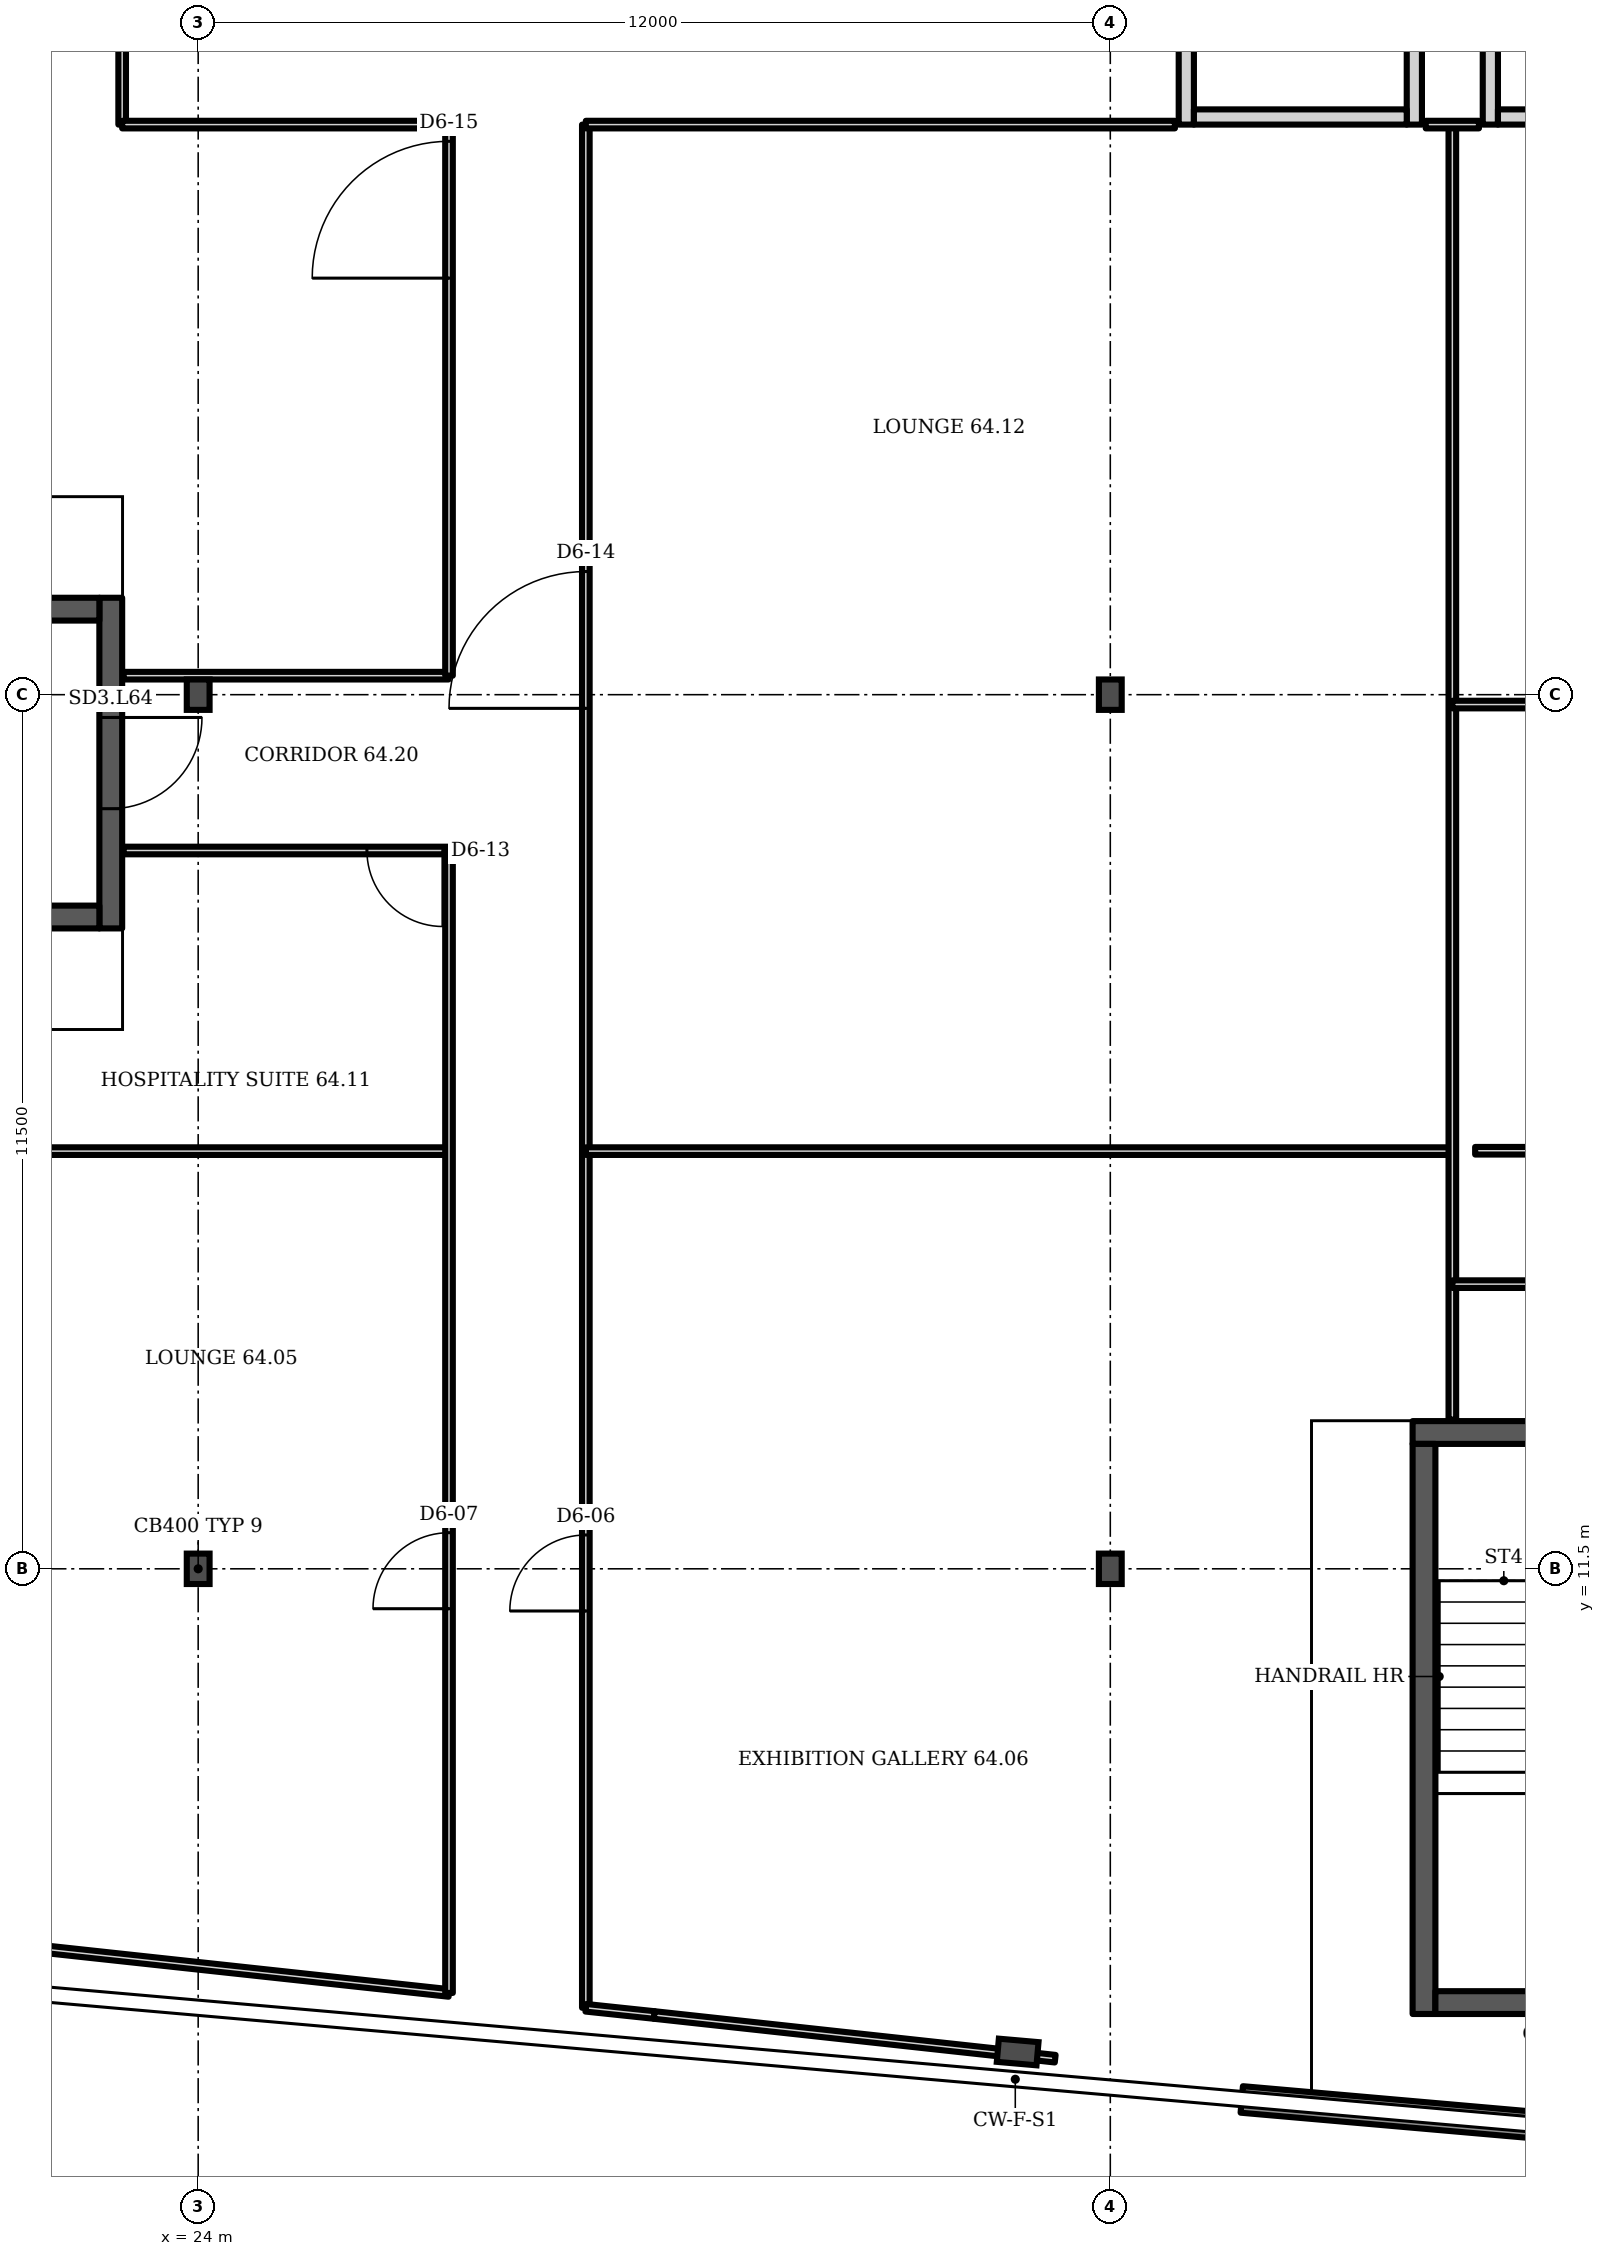
"""IFC4 building model, lengths in metres.
Left out: names, types, materials, properties, quantities, classifications, styles, units other than length and angle.
Written with IfcOpenShell. Run it as: python <this file> out.ifc"""

import sys

from ifc_helpers import new_model, si_unit, direction, frame, frame_2d, origin, origin_2d, place, context, subcontext, project, spatial, rectangle, i_section, extrude, element, fill, save


model = new_model("IFC4")
c1 = context("Model", 3, precision=1e-05, world=origin(), true_north=direction((0.0, 1.0)))
c2 = subcontext(c1, "Body", "Model", "MODEL_VIEW")
j1 = project(units=[si_unit("LENGTHUNIT", "METRE"), si_unit("PLANEANGLEUNIT", "RADIAN")], contexts=[c1])
p1 = place(None, origin())
s1 = spatial("IfcSite", under=j1, at=p1, CompositionType="ELEMENT")
p2 = place(p1, origin())
s2 = spatial("IfcBuilding", under=s1, at=p2, CompositionType="ELEMENT")
p3 = place(p2, frame((0.0, 0.0, 253.9)))
s3 = spatial("IfcBuildingStorey", under=s2, at=p3, CompositionType="ELEMENT", Elevation=253.9)
p4 = place(p3, frame((34.781, 5.143, 0.0), z_axis=(0.0, 0.0, 1.0), x_axis=(-0.087156, -0.996197, 0.0)))
e1 = element("IfcColumn", 1, at=p4, inside=s3, PredefinedType="COLUMN", context=c2, shape_type="SweptSolid", body=[
    extrude(i_section(OverallWidth=0.306, OverallDepth=0.524, WebThickness=0.021, FlangeThickness=0.04, FilletRadius=0.027, at=origin_2d()), origin(), (0.0, 0.0, 1.0), 3.6),
])
for number, where, z_axis, x_axis in (
    (2, (24.0, 11.5, 0.0), (0.0, 0.0, 1.0), (1.0, 0.0, 0.0)),
    (3, (36.0, 11.5, 0.0), (0.0, 0.0, 1.0), (1.0, 0.0, 0.0)),
    (4, (24.0, 23.0, 0.0), (0.0, 0.0, 1.0), (1.0, 0.0, 0.0)),
    (5, (36.0, 23.0, 0.0), (0.0, 0.0, 1.0), (1.0, 0.0, 0.0)),
):
    element("IfcColumn", number, at=place(p3, frame(where, z_axis=z_axis, x_axis=x_axis)), inside=s3, PredefinedType="COLUMN", context=c2, shape_type="SweptSolid", body=[
        extrude(i_section(OverallWidth=0.3, OverallDepth=0.4, WebThickness=0.013, FlangeThickness=0.024, FilletRadius=0.027, at=origin_2d()), origin(), (0.0, 0.0, 1.0), 3.6),
    ])
p5 = place(p3, frame((37.729, 4.519, 0.0), z_axis=(0.0, 0.0, 1.0), x_axis=(0.99619, -0.087167, 0.0)))
e6 = element("IfcWall", 6, at=p5, inside=s3, PredefinedType="SOLIDWALL", context=c2, shape_type="SweptSolid", body=[
    extrude(rectangle(XDim=11.831, YDim=0.35, at=frame_2d((5.915, 0.0))), origin(), (0.0, 0.0, 1.0), 1.0),
])
p6 = place(p3, frame((37.0, 30.5, 0.0), z_axis=(0.0, 0.0, 1.0), x_axis=(0.0, 1.0, 0.0)))
e7 = element("IfcWall", 7, at=p6, inside=s3, PredefinedType="PARTITIONING", context=c2, shape_type="SweptSolid", body=[
    extrude(rectangle(XDim=3.5, YDim=0.2, at=frame_2d((1.75, 0.0))), origin(), (0.0, 0.0, 1.0), 3.2),
])
p7 = place(p6, frame((1.2, 0.0, 0.0)))
e8 = element("IfcOpeningElement", 8, at=p7, cuts=e7, PredefinedType="OPENING", context=c2, shape_type="SweptSolid", body=[
    extrude(rectangle(XDim=1.1, YDim=2.1, at=frame_2d((0.55, 1.05))), frame((0.0, 0.11, 0.0), z_axis=(0.0, -1.0, 0.0), x_axis=(1.0, 0.0, 0.0)), (0.0, 0.0, 1.0), 0.22),
])
p8 = place(p3, frame((40.0, 30.5, 0.0), z_axis=(0.0, 0.0, 1.0), x_axis=(0.0, 1.0, 0.0)))
e9 = element("IfcWall", 9, at=p8, inside=s3, PredefinedType="PARTITIONING", context=c2, shape_type="SweptSolid", body=[
    extrude(rectangle(XDim=3.5, YDim=0.2, at=frame_2d((1.75, 0.0))), origin(), (0.0, 0.0, 1.0), 3.2),
])
p9 = place(p3, frame((37.1, 30.6, 0.0), z_axis=(0.0, 0.0, 1.0), x_axis=(1.0, 0.0, 0.0)))
e10 = element("IfcWall", 10, at=p9, inside=s3, PredefinedType="PARTITIONING", context=c2, shape_type="SweptSolid", body=[
    extrude(rectangle(XDim=2.8, YDim=0.2, at=frame_2d((1.4, 0.0))), origin(), (0.0, 0.0, 1.0), 3.2),
])
p10 = place(p3, frame((41.0, 30.5, 0.0), z_axis=(0.0, 0.0, 1.0), x_axis=(0.0, 1.0, 0.0)))
e11 = element("IfcWall", 11, at=p10, inside=s3, PredefinedType="PARTITIONING", context=c2, shape_type="SweptSolid", body=[
    extrude(rectangle(XDim=3.5, YDim=0.2, at=frame_2d((1.75, 0.0))), origin(), (0.0, 0.0, 1.0), 3.2),
])
p11 = place(p3, frame((41.1, 30.6, 0.0), z_axis=(0.0, 0.0, 1.0), x_axis=(1.0, 0.0, 0.0)))
e12 = element("IfcWall", 12, at=p11, inside=s3, PredefinedType="PARTITIONING", context=c2, shape_type="SweptSolid", body=[
    extrude(rectangle(XDim=2.8, YDim=0.2, at=frame_2d((1.4, 0.0))), origin(), (0.0, 0.0, 1.0), 3.2),
])
p12 = place(p3, frame((22.85, 19.925, 0.0), z_axis=(0.0, 0.0, 1.0), x_axis=(0.0, 1.0, 0.0)))
e13 = element("IfcWall", 13, at=p12, inside=s3, PredefinedType="SHEAR", context=c2, shape_type="SweptSolid", body=[
    extrude(rectangle(XDim=4.35, YDim=0.3, at=frame_2d((2.175, 0.0))), origin(), (0.0, 0.0, 1.0), 3.2),
])
p13 = place(p12, frame((1.575, 0.0, 0.0)))
e14 = element("IfcOpeningElement", 14, at=p13, cuts=e13, PredefinedType="OPENING", context=c2, shape_type="SweptSolid", body=[
    extrude(rectangle(XDim=1.2, YDim=2.1, at=frame_2d((0.6, 1.05))), frame((0.0, 0.16, 0.0), z_axis=(0.0, -1.0, 0.0), x_axis=(1.0, 0.0, 0.0)), (0.0, 0.0, 1.0), 0.32),
])
p14 = place(p3, frame((39.977, 13.293, 0.0), z_axis=(0.0, 0.0, 1.0), x_axis=(1.0, 0.0, 0.0)))
e15 = element("IfcWall", 15, at=p14, inside=s3, PredefinedType="SHEAR", context=c2, shape_type="SweptSolid", body=[
    extrude(rectangle(XDim=4.35, YDim=0.3, at=frame_2d((2.175, 0.0))), origin(), (0.0, 0.0, 1.0), 3.2),
])
p15 = place(p14, frame((1.575, 0.0, 0.0)))
e16 = element("IfcOpeningElement", 16, at=p15, cuts=e15, PredefinedType="OPENING", context=c2, shape_type="SweptSolid", body=[
    extrude(rectangle(XDim=1.2, YDim=2.1, at=frame_2d((0.6, 1.05))), frame((0.0, 0.16, 0.0), z_axis=(0.0, -1.0, 0.0), x_axis=(1.0, 0.0, 0.0)), (0.0, 0.0, 1.0), 0.32),
])
p16 = place(p3, frame((14.96, 16.995, 0.0), z_axis=(0.0, 0.0, 1.0), x_axis=(1.0, 0.0, 0.0)))
e17 = element("IfcWall", 17, at=p16, inside=s3, PredefinedType="PARTITIONING", context=c2, shape_type="SweptSolid", body=[
    extrude(rectangle(XDim=12.34, YDim=0.1, at=frame_2d((6.17, 0.0))), origin(), (0.0, 0.0, 1.0), 3.2),
])
p17 = place(p3, frame((23.0, 30.5, 0.0), z_axis=(0.0, 0.0, 1.0), x_axis=(0.0, 1.0, 0.0)))
e18 = element("IfcWall", 18, at=p17, inside=s3, PredefinedType="PARTITIONING", context=c2, shape_type="SweptSolid", body=[
    extrude(rectangle(XDim=3.48, YDim=0.1, at=frame_2d((1.74, 0.0))), origin(), (0.0, 0.0, 1.0), 3.2),
])
p18 = place(p3, frame((23.0, 30.5, 0.0), z_axis=(0.0, 0.0, 1.0), x_axis=(1.0, 0.0, 0.0)))
e19 = element("IfcWall", 19, at=p18, inside=s3, PredefinedType="PARTITIONING", context=c2, shape_type="SweptSolid", body=[
    extrude(rectangle(XDim=4.3, YDim=0.1, at=frame_2d((2.15, 0.0))), origin(), (0.0, 0.0, 1.0), 3.2),
])
p19 = place(p3, frame((23.02, 20.95, 0.0), z_axis=(0.0, 0.0, 1.0), x_axis=(1.0, 0.0, 0.0)))
e20 = element("IfcWall", 20, at=p19, inside=s3, PredefinedType="PARTITIONING", context=c2, shape_type="SweptSolid", body=[
    extrude(rectangle(XDim=4.28, YDim=0.1, at=frame_2d((2.14, 0.0))), origin(), (0.0, 0.0, 1.0), 3.2),
])
p20 = place(p19, frame((3.2, 0.0, 0.0)))
e21 = element("IfcOpeningElement", 21, at=p20, cuts=e20, PredefinedType="OPENING", context=c2, shape_type="SweptSolid", body=[
    extrude(rectangle(XDim=1.0, YDim=2.1, at=frame_2d((0.5, 1.05))), frame((0.0, 0.06, 0.0), z_axis=(0.0, -1.0, 0.0), x_axis=(1.0, 0.0, 0.0)), (0.0, 0.0, 1.0), 0.12),
])
p21 = place(p3, frame((23.02, 23.25, 0.0), z_axis=(0.0, 0.0, 1.0), x_axis=(1.0, 0.0, 0.0)))
e22 = element("IfcWall", 22, at=p21, inside=s3, PredefinedType="PARTITIONING", context=c2, shape_type="SweptSolid", body=[
    extrude(rectangle(XDim=4.275, YDim=0.1, at=frame_2d((2.137, 0.0))), origin(), (0.0, 0.0, 1.0), 3.2),
])
p22 = place(p3, frame((27.3, 5.92, 0.0), z_axis=(0.0, 0.0, 1.0), x_axis=(-0.994192, 0.107591, 0.0)))
e23 = element("IfcWall", 23, at=p22, inside=s3, PredefinedType="PARTITIONING", context=c2, shape_type="SweptSolid", body=[
    extrude(rectangle(XDim=7.323, YDim=0.1, at=frame_2d((3.661, 0.0))), origin(), (0.0, 0.0, 1.0), 2.58),
])
p23 = place(p3, frame((27.3, 23.25, 0.0), z_axis=(0.0, 0.0, 1.0), x_axis=(0.0, 1.0, 0.0)))
e24 = element("IfcWall", 24, at=p23, inside=s3, PredefinedType="PARTITIONING", context=c2, shape_type="SweptSolid", body=[
    extrude(rectangle(XDim=7.25, YDim=0.1, at=frame_2d((3.625, 0.0))), origin(), (0.0, 0.0, 1.0), 3.2),
])
p24 = place(p23, frame((5.23, 0.0, 0.0)))
e25 = element("IfcOpeningElement", 25, at=p24, cuts=e24, PredefinedType="OPENING", context=c2, shape_type="SweptSolid", body=[
    extrude(rectangle(XDim=1.8, YDim=2.1, at=frame_2d((0.9, 1.05))), frame((0.0, 0.06, 0.0), z_axis=(0.0, -1.0, 0.0), x_axis=(1.0, 0.0, 0.0)), (0.0, 0.0, 1.0), 0.12),
])
p25 = place(p3, frame((27.3, 5.92, 0.0), z_axis=(0.0, 0.0, 1.0), x_axis=(0.0, 1.0, 0.0)))
e26 = element("IfcWall", 26, at=p25, inside=s3, PredefinedType="PARTITIONING", context=c2, shape_type="SweptSolid", body=[
    extrude(rectangle(XDim=15.03, YDim=0.1, at=frame_2d((7.515, 0.0))), origin(), (0.0, 0.0, 1.0), 3.2),
])
p26 = place(p25, frame((5.055, 0.0, 0.0)))
e27 = element("IfcOpeningElement", 27, at=p26, cuts=e26, PredefinedType="OPENING", context=c2, shape_type="SweptSolid", body=[
    extrude(rectangle(XDim=1.0, YDim=2.1, at=frame_2d((0.5, 1.05))), frame((0.0, 0.06, 0.0), z_axis=(0.0, -1.0, 0.0), x_axis=(1.0, 0.0, 0.0)), (0.0, 0.0, 1.0), 0.12),
])
p27 = place(p3, frame((29.1, 5.725, 0.0), z_axis=(0.0, 0.0, 1.0), x_axis=(0.0, 1.0, 0.0)))
e28 = element("IfcWall", 28, at=p27, inside=s3, PredefinedType="PARTITIONING", context=c2, shape_type="SweptSolid", body=[
    extrude(rectangle(XDim=24.775, YDim=0.1, at=frame_2d((12.387, 0.0))), origin(), (0.0, 0.0, 1.0), 3.2),
])
p28 = place(p27, frame((5.22, 0.0, 0.0)))
e29 = element("IfcOpeningElement", 29, at=p28, cuts=e28, PredefinedType="OPENING", context=c2, shape_type="SweptSolid", body=[
    extrude(rectangle(XDim=1.0, YDim=2.1, at=frame_2d((0.5, 1.05))), frame((0.0, 0.06, 0.0), z_axis=(0.0, -1.0, 0.0), x_axis=(1.0, 0.0, 0.0)), (0.0, 0.0, 1.0), 0.12),
])
p29 = place(p27, frame((17.095, 0.0, 0.0)))
e30 = element("IfcOpeningElement", 30, at=p29, cuts=e28, PredefinedType="OPENING", context=c2, shape_type="SweptSolid", body=[
    extrude(rectangle(XDim=1.8, YDim=2.1, at=frame_2d((0.9, 1.05))), frame((0.0, 0.06, 0.0), z_axis=(0.0, -1.0, 0.0), x_axis=(1.0, 0.0, 0.0)), (0.0, 0.0, 1.0), 0.12),
])
p30 = place(p3, frame((29.1, 16.995, 0.0), z_axis=(0.0, 0.0, 1.0), x_axis=(1.0, 0.0, 0.0)))
e31 = element("IfcWall", 31, at=p30, inside=s3, PredefinedType="PARTITIONING", context=c2, shape_type="SweptSolid", body=[
    extrude(rectangle(XDim=11.4, YDim=0.1, at=frame_2d((5.7, 0.0))), origin(), (0.0, 0.0, 1.0), 3.2),
])
p31 = place(p3, frame((29.1, 30.5, 0.0), z_axis=(0.0, 0.0, 1.0), x_axis=(1.0, 0.0, 0.0)))
e32 = element("IfcWall", 32, at=p31, inside=s3, PredefinedType="PARTITIONING", context=c2, shape_type="SweptSolid", body=[
    extrude(rectangle(XDim=7.75, YDim=0.1, at=frame_2d((3.875, 0.0))), origin(), (0.0, 0.0, 1.0), 3.2),
])
p32 = place(p3, frame((30.0, 5.63, 0.0), z_axis=(0.0, 0.0, 1.0), x_axis=(-0.994445, 0.105218, 0.0)))
e33 = element("IfcWall", 33, at=p32, inside=s3, PredefinedType="PARTITIONING", context=c2, shape_type="SweptSolid", body=[
    extrude(rectangle(XDim=0.905, YDim=0.1, at=frame_2d((0.453, 0.0))), origin(), (0.0, 0.0, 1.0), 2.58),
])
p33 = place(p3, frame((35.275, 5.055, 0.0), z_axis=(0.0, 0.0, 1.0), x_axis=(-0.994115, 0.108356, 0.0)))
e34 = element("IfcWall", 34, at=p33, inside=s3, PredefinedType="PARTITIONING", context=c2, shape_type="SweptSolid", body=[
    extrude(rectangle(XDim=5.306, YDim=0.1, at=frame_2d((2.653, 0.0))), origin(), (0.0, 0.0, 1.0), 2.58),
])
p34 = place(p3, frame((40.5, 13.463, 0.0), z_axis=(0.0, 0.0, 1.0), x_axis=(0.0, 1.0, 0.0)))
e35 = element("IfcWall", 35, at=p34, inside=s3, PredefinedType="PARTITIONING", context=c2, shape_type="SweptSolid", body=[
    extrude(rectangle(XDim=17.037, YDim=0.1, at=frame_2d((8.519, 0.0))), origin(), (0.0, 0.0, 1.0), 3.2),
])
p35 = place(p3, frame((40.5, 15.245, 0.0), z_axis=(0.0, 0.0, 1.0), x_axis=(1.0, 0.0, 0.0)))
e36 = element("IfcWall", 36, at=p35, inside=s3, PredefinedType="PARTITIONING", context=c2, shape_type="SweptSolid", body=[
    extrude(rectangle(XDim=9.52, YDim=0.1, at=frame_2d((4.76, 0.0))), origin(), (0.0, 0.0, 1.0), 3.2),
])
p36 = place(p35, frame((8.125, 0.0, 0.0)))
e37 = element("IfcOpeningElement", 37, at=p36, cuts=e36, PredefinedType="OPENING", context=c2, shape_type="SweptSolid", body=[
    extrude(rectangle(XDim=1.0, YDim=2.1, at=frame_2d((0.5, 1.05))), frame((0.0, 0.06, 0.0), z_axis=(0.0, -1.0, 0.0), x_axis=(1.0, 0.0, 0.0)), (0.0, 0.0, 1.0), 0.12),
])
p37 = place(p3, frame((40.5, 22.87, 0.0), z_axis=(0.0, 0.0, 1.0), x_axis=(1.0, 0.0, 0.0)))
e38 = element("IfcWall", 38, at=p37, inside=s3, PredefinedType="PARTITIONING", context=c2, shape_type="SweptSolid", body=[
    extrude(rectangle(XDim=9.52, YDim=0.1, at=frame_2d((4.76, 0.0))), origin(), (0.0, 0.0, 1.0), 3.2),
])
p38 = place(p3, frame((40.8, 17.0, 0.0), z_axis=(0.0, 0.0, 1.0), x_axis=(1.0, 0.0, 0.0)))
e39 = element("IfcWall", 39, at=p38, inside=s3, PredefinedType="PARTITIONING", context=c2, shape_type="SweptSolid", body=[
    extrude(rectangle(XDim=1.325, YDim=0.1, at=frame_2d((0.663, 0.0))), origin(), (0.0, 0.0, 1.0), 3.2),
])
p39 = place(p3, frame((40.15, 30.5, 0.0), z_axis=(0.0, 0.0, 1.0), x_axis=(1.0, 0.0, 0.0)))
e40 = element("IfcWall", 40, at=p39, inside=s3, PredefinedType="PARTITIONING", context=c2, shape_type="SweptSolid", body=[
    extrude(rectangle(XDim=0.7, YDim=0.1, at=frame_2d((0.35, 0.0))), origin(), (0.0, 0.0, 1.0), 3.2),
])
for number, where, z_axis, x_axis in (
    (41, (15.2, 20.075, 0.0), (0.0, 0.0, 1.0), (1.0, 0.0, 0.0)),
    (42, (15.2, 24.125, 0.0), (0.0, 0.0, 1.0), (1.0, 0.0, 0.0)),
    (43, (40.127, 5.643, 0.0), (0.0, 0.0, 1.0), (0.0, 1.0, 0.0)),
):
    element("IfcWall", number, at=place(p3, frame(where, z_axis=z_axis, x_axis=x_axis)), inside=s3, PredefinedType="SHEAR", context=c2, shape_type="SweptSolid", body=[
        extrude(rectangle(XDim=7.5, YDim=0.3, at=frame_2d((3.75, 0.0))), origin(), (0.0, 0.0, 1.0), 3.2),
    ])
p40 = place(p3, frame((40.277, 5.793, 0.0), z_axis=(0.0, 0.0, 1.0), x_axis=(1.0, 0.0, 0.0)))
e44 = element("IfcWall", 44, at=p40, inside=s3, PredefinedType="SHEAR", context=c2, shape_type="SweptSolid", body=[
    extrude(rectangle(XDim=3.75, YDim=0.3, at=frame_2d((1.875, 0.0))), origin(), (0.0, 0.0, 1.0), 3.2),
])
p41 = place(p13, origin())
e45 = element("IfcDoor", 45, at=p41, inside=s3, OperationType="SINGLE_SWING_RIGHT", PredefinedType="DOOR", context=c2, shape_type="SweptSolid", body=[
    extrude(rectangle(XDim=1.2, YDim=2.1, at=frame_2d((0.6, 1.05))), frame((0.0, 0.025, 0.0), z_axis=(0.0, -1.0, 0.0), x_axis=(1.0, 0.0, 0.0)), (0.0, 0.0, 1.0), 0.05),
])
fill(e14, e45)
p42 = place(p28, origin())
e46 = element("IfcDoor", 46, at=p42, inside=s3, OperationType="SINGLE_SWING_LEFT", PredefinedType="DOOR", context=c2, shape_type="SweptSolid", body=[
    extrude(rectangle(XDim=1.0, YDim=2.1, at=frame_2d((0.5, 1.05))), frame((0.0, 0.025, 0.0), z_axis=(0.0, -1.0, 0.0), x_axis=(1.0, 0.0, 0.0)), (0.0, 0.0, 1.0), 0.05),
])
fill(e29, e46)
p43 = place(p26, origin())
e47 = element("IfcDoor", 47, at=p43, inside=s3, OperationType="SINGLE_SWING_LEFT", PredefinedType="DOOR", context=c2, shape_type="SweptSolid", body=[
    extrude(rectangle(XDim=1.0, YDim=2.1, at=frame_2d((0.5, 1.05))), frame((0.0, 0.025, 0.0), z_axis=(0.0, -1.0, 0.0), x_axis=(1.0, 0.0, 0.0)), (0.0, 0.0, 1.0), 0.05),
])
fill(e27, e47)
p44 = place(p20, origin())
e48 = element("IfcDoor", 48, at=p44, inside=s3, OperationType="SINGLE_SWING_RIGHT", PredefinedType="DOOR", context=c2, shape_type="SweptSolid", body=[
    extrude(rectangle(XDim=1.0, YDim=2.1, at=frame_2d((0.5, 1.05))), frame((0.0, 0.025, 0.0), z_axis=(0.0, -1.0, 0.0), x_axis=(1.0, 0.0, 0.0)), (0.0, 0.0, 1.0), 0.05),
])
fill(e21, e48)
p45 = place(p29, origin())
e49 = element("IfcDoor", 49, at=p45, inside=s3, OperationType="DOUBLE_DOOR_SINGLE_SWING", PredefinedType="DOOR", context=c2, shape_type="SweptSolid", body=[
    extrude(rectangle(XDim=1.8, YDim=2.1, at=frame_2d((0.9, 1.05))), frame((0.0, 0.025, 0.0), z_axis=(0.0, -1.0, 0.0), x_axis=(1.0, 0.0, 0.0)), (0.0, 0.0, 1.0), 0.05),
])
fill(e30, e49)
p46 = place(p24, origin())
e50 = element("IfcDoor", 50, at=p46, inside=s3, OperationType="DOUBLE_DOOR_SINGLE_SWING", PredefinedType="DOOR", context=c2, shape_type="SweptSolid", body=[
    extrude(rectangle(XDim=1.8, YDim=2.1, at=frame_2d((0.9, 1.05))), frame((0.0, 0.025, 0.0), z_axis=(0.0, -1.0, 0.0), x_axis=(1.0, 0.0, 0.0)), (0.0, 0.0, 1.0), 0.05),
])
fill(e25, e50)
save(model, sys.argv[1])
